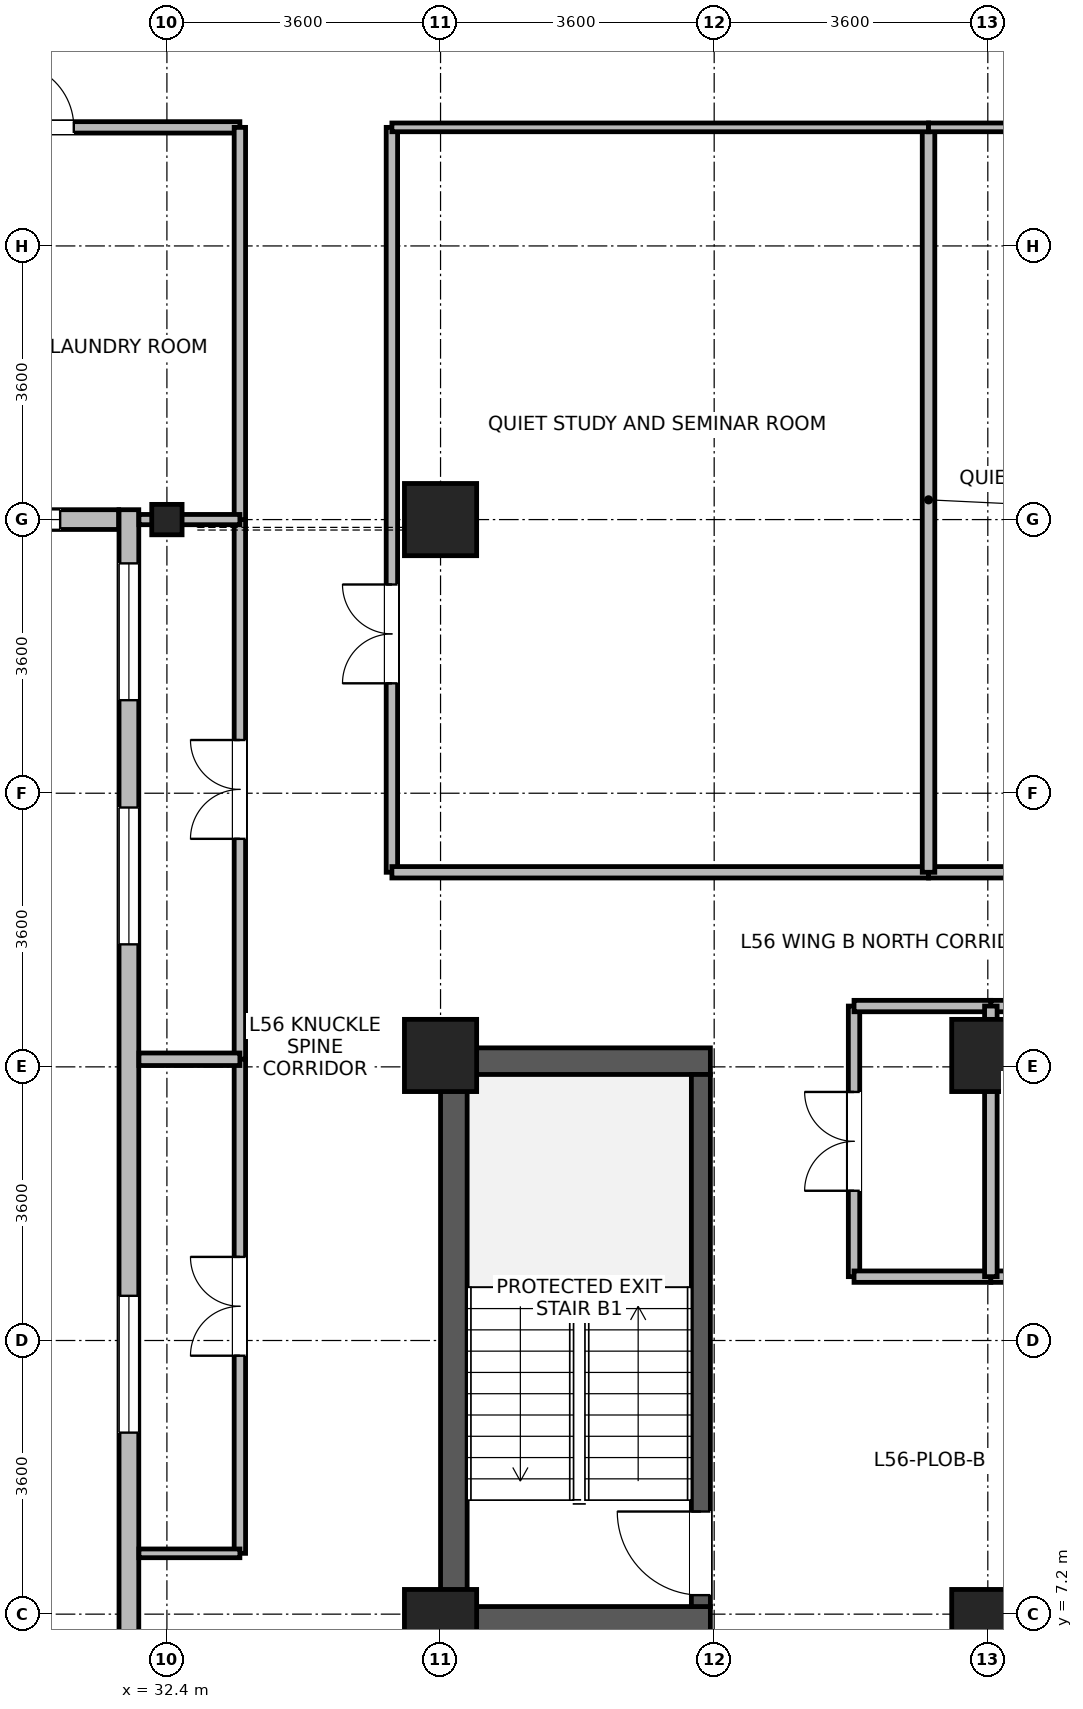
"""IFC4 building model, lengths in metres.
Left out: names, types, materials, properties, quantities, classifications, styles, units other than length and angle.
Written with IfcOpenShell. Run it as: python <this file> out.ifc"""

import sys

from ifc_helpers import new_model, si_unit, direction, frame, frame_2d, origin, origin_2d, place, context, subcontext, project, spatial, rectangle, i_section, extrude, source, transform, mapped, element, fill, save


model = new_model("IFC4")
c1 = context("Model", 3, precision=1e-05, world=origin(), true_north=direction((0.0, 1.0)))
c2 = subcontext(c1, "Body", "Model", "MODEL_VIEW")
j1 = project(units=[si_unit("LENGTHUNIT", "METRE"), si_unit("PLANEANGLEUNIT", "RADIAN")], contexts=[c1])
p1 = place(None, origin())
s1 = spatial("IfcSite", under=j1, at=p1, CompositionType="ELEMENT")
p2 = place(p1, origin())
s2 = spatial("IfcBuilding", under=s1, at=p2, CompositionType="ELEMENT")
p3 = place(p2, frame((0.0, 0.0, 220.3)))
s3 = spatial("IfcBuildingStorey", under=s2, at=p3, CompositionType="ELEMENT", Elevation=220.3)
p4 = place(p3, frame((36.175, 6.95, 0.0), z_axis=(0.0, 0.0, 1.0), x_axis=(0.0, 1.0, 0.0)))
e1 = element("IfcWall", 1, at=p4, inside=s3, PredefinedType="SHEAR", context=c2, shape_type="SweptSolid", body=[
    extrude(rectangle(XDim=7.7, YDim=0.35, at=frame_2d((3.85, 0.0))), origin(), (0.0, 0.0, 1.0), 3.47),
])
for number, where, z_axis, x_axis in (
    (2, (36.35, 7.125, 0.0), (0.0, 0.0, 1.0), (1.0, 0.0, 0.0)),
    (3, (36.35, 14.475, 0.0), (0.0, 0.0, 1.0), (1.0, 0.0, 0.0)),
):
    element("IfcWall", number, at=place(p3, frame(where, z_axis=z_axis, x_axis=x_axis)), inside=s3, PredefinedType="SHEAR", context=c2, shape_type="SweptSolid", body=[
        extrude(rectangle(XDim=3.2, YDim=0.35, at=frame_2d((1.6, 0.0))), origin(), (0.0, 0.0, 1.0), 3.47),
    ])
p5 = place(p3, frame((39.425, 7.3, 0.0), z_axis=(0.0, 0.0, 1.0), x_axis=(0.0, 1.0, 0.0)))
e4 = element("IfcWall", 4, at=p5, inside=s3, PredefinedType="SHEAR", context=c2, shape_type="SweptSolid", body=[
    extrude(rectangle(XDim=7.0, YDim=0.25, at=frame_2d((3.5, 0.0))), origin(), (0.0, 0.0, 1.0), 3.47),
])
p6 = place(p5, frame((0.15, 0.0, 0.0)))
e5 = element("IfcOpeningElement", 5, at=p6, cuts=e4, PredefinedType="OPENING", context=c2, shape_type="SweptSolid", body=[
    extrude(rectangle(XDim=1.1, YDim=2.08, at=frame_2d((0.55, 1.04))), frame((0.0, 0.135, 0.0), z_axis=(0.0, -1.0, 0.0), x_axis=(1.0, 0.0, 0.0)), (0.0, 0.0, 1.0), 0.27),
])
m1 = source(origin(), c2, "Body", "SweptSolid", [
    extrude(rectangle(XDim=0.95, YDim=0.95, at=origin_2d()), origin(), (0.0, 0.0, 1.0), 3.7),
])
for number, where, z_axis, x_axis in (
    (6, (36.0, 21.6, 0.0), (0.0, 0.0, 1.0), (1.0, 0.0, 0.0)),
    (7, (36.0, 7.05, 0.0), (0.0, 0.0, 1.0), (1.0, 0.0, 0.0)),
    (8, (36.0, 14.55, 0.0), (0.0, 0.0, 1.0), (1.0, 0.0, 0.0)),
    (9, (43.2, 7.05, 0.0), (0.0, 0.0, 1.0), (1.0, 0.0, 0.0)),
    (10, (43.2, 14.55, 0.0), (0.0, 0.0, 1.0), (1.0, 0.0, 0.0)),
):
    element("IfcColumn", number, at=place(p3, frame(where, z_axis=z_axis, x_axis=x_axis)), inside=s3, PredefinedType="COLUMN", context=c2, shape_type="MappedRepresentation", body=[
        mapped(m1, transform((0.0, 0.0, 0.0), x_axis=(1.0, 0.0, 0.0), y_axis=(0.0, 1.0, 0.0), z_axis=(0.0, 0.0, 1.0), scale=1.0)),
    ])
m2 = source(origin(), c2, "Body", "SweptSolid", [
    extrude(i_section(OverallWidth=0.399, OverallDepth=0.4, WebThickness=0.017, FlangeThickness=0.023, FilletRadius=0.015, at=origin_2d()), origin(), (0.0, 0.0, 1.0), 3.7),
])
p7 = place(p3, frame((32.4, 21.6, 0.0), z_axis=(0.0, 0.0, 1.0), x_axis=(1.0, 0.0, 0.0)))
e11 = element("IfcColumn", 11, at=p7, inside=s3, PredefinedType="COLUMN", context=c2, shape_type="MappedRepresentation", body=[
    mapped(m2, transform((0.0, 0.0, 0.0), x_axis=(1.0, 0.0, 0.0), y_axis=(0.0, 1.0, 0.0), z_axis=(0.0, 0.0, 1.0), scale=1.0)),
])
p8 = place(p3, frame((31.765, 21.6, 0.0), z_axis=(0.0, 0.0, 1.0), x_axis=(-1.0, 0.0, 0.0)))
e12 = element("IfcWall", 12, at=p8, inside=s3, PredefinedType="STANDARD", context=c2, shape_type="SweptSolid", body=[
    extrude(rectangle(XDim=2.489, YDim=0.26, at=frame_2d((1.245, 0.0))), origin(), (0.0, 0.0, 1.0), 3.05),
])
p9 = place(p8, frame((0.77, 0.0, 0.85)))
e13 = element("IfcOpeningElement", 13, at=p9, cuts=e12, PredefinedType="OPENING", context=c2, shape_type="SweptSolid", body=[
    extrude(rectangle(XDim=0.95, YDim=1.75, at=frame_2d((0.475, 0.875))), frame((0.0, 0.14, 0.0), z_axis=(0.0, -1.0, 0.0), x_axis=(1.0, 0.0, 0.0)), (0.0, 0.0, 1.0), 0.28),
])
p10 = place(p3, frame((31.9, 5.67, 0.0), z_axis=(0.0, 0.0, 1.0), x_axis=(0.0, 1.0, 0.0)))
e14 = element("IfcWall", 14, at=p10, inside=s3, PredefinedType="STANDARD", context=c2, shape_type="SweptSolid", body=[
    extrude(rectangle(XDim=16.06, YDim=0.26, at=frame_2d((8.03, 0.0))), origin(), (0.0, 0.0, 1.0), 3.45),
])
p11 = place(p10, frame((3.918, 0.0, 0.85)))
e15 = element("IfcOpeningElement", 15, at=p11, cuts=e14, PredefinedType="OPENING", context=c2, shape_type="SweptSolid", body=[
    extrude(rectangle(XDim=1.8, YDim=1.85, at=frame_2d((0.9, 0.925))), frame((0.0, 0.14, 0.0), z_axis=(0.0, -1.0, 0.0), x_axis=(1.0, 0.0, 0.0)), (0.0, 0.0, 1.0), 0.28),
])
p12 = place(p10, frame((10.342, 0.0, 0.85)))
e16 = element("IfcOpeningElement", 16, at=p12, cuts=e14, PredefinedType="OPENING", context=c2, shape_type="SweptSolid", body=[
    extrude(rectangle(XDim=1.8, YDim=1.85, at=frame_2d((0.9, 0.925))), frame((0.0, 0.14, 0.0), z_axis=(0.0, -1.0, 0.0), x_axis=(1.0, 0.0, 0.0)), (0.0, 0.0, 1.0), 0.28),
])
p13 = place(p10, frame((13.554, 0.0, 0.85)))
e17 = element("IfcOpeningElement", 17, at=p13, cuts=e14, PredefinedType="OPENING", context=c2, shape_type="SweptSolid", body=[
    extrude(rectangle(XDim=1.8, YDim=1.85, at=frame_2d((0.9, 0.925))), frame((0.0, 0.14, 0.0), z_axis=(0.0, -1.0, 0.0), x_axis=(1.0, 0.0, 0.0)), (0.0, 0.0, 1.0), 0.28),
])
p14 = place(p3, frame((35.36, 16.96, 0.0), z_axis=(0.0, 0.0, 1.0), x_axis=(0.0, 1.0, 0.0)))
e18 = element("IfcWall", 18, at=p14, inside=s3, PredefinedType="PARTITIONING", context=c2, shape_type="SweptSolid", body=[
    extrude(rectangle(XDim=9.8, YDim=0.15, at=frame_2d((4.9, 0.0))), origin(), (0.0, 0.0, 1.0), 3.45),
])
p15 = place(p14, frame((2.486, 0.0, 0.0)))
e19 = element("IfcOpeningElement", 19, at=p15, cuts=e18, PredefinedType="OPENING", context=c2, shape_type="SweptSolid", body=[
    extrude(rectangle(XDim=1.3, YDim=2.12, at=frame_2d((0.65, 1.06))), frame((0.0, 0.085, 0.0), z_axis=(0.0, -1.0, 0.0), x_axis=(1.0, 0.0, 0.0)), (0.0, 0.0, 1.0), 0.17),
])
p16 = place(p3, frame((33.36, 14.5, 0.0), z_axis=(0.0, 0.0, 1.0), x_axis=(0.0, 1.0, 0.0)))
e20 = element("IfcWall", 20, at=p16, inside=s3, PredefinedType="PARTITIONING", context=c2, shape_type="SweptSolid", body=[
    extrude(rectangle(XDim=7.1, YDim=0.15, at=frame_2d((3.55, 0.0))), origin(), (0.0, 0.0, 1.0), 3.45),
])
p17 = place(p16, frame((2.9, 0.0, 0.0)))
e21 = element("IfcOpeningElement", 21, at=p17, cuts=e20, PredefinedType="OPENING", context=c2, shape_type="SweptSolid", body=[
    extrude(rectangle(XDim=1.3, YDim=2.12, at=frame_2d((0.65, 1.06))), frame((0.0, 0.085, 0.0), z_axis=(0.0, -1.0, 0.0), x_axis=(1.0, 0.0, 0.0)), (0.0, 0.0, 1.0), 0.17),
])
p18 = place(p3, frame((35.36, 16.96, 0.0), z_axis=(0.0, 0.0, 1.0), x_axis=(1.0, 0.0, 0.0)))
e22 = element("IfcWall", 22, at=p18, inside=s3, PredefinedType="PARTITIONING", context=c2, shape_type="SweptSolid", body=[
    extrude(rectangle(XDim=7.06, YDim=0.15, at=frame_2d((3.53, 0.0))), origin(), (0.0, 0.0, 1.0), 3.45),
])
p19 = place(p3, frame((33.36, 8.0, 0.0), z_axis=(0.0, 0.0, 1.0), x_axis=(0.0, 1.0, 0.0)))
e23 = element("IfcWall", 23, at=p19, inside=s3, PredefinedType="PARTITIONING", context=c2, shape_type="SweptSolid", body=[
    extrude(rectangle(XDim=6.5, YDim=0.15, at=frame_2d((3.25, 0.0))), origin(), (0.0, 0.0, 1.0), 3.45),
])
p20 = place(p19, frame((2.6, 0.0, 0.0)))
e24 = element("IfcOpeningElement", 24, at=p20, cuts=e23, PredefinedType="OPENING", context=c2, shape_type="SweptSolid", body=[
    extrude(rectangle(XDim=1.3, YDim=2.12, at=frame_2d((0.65, 1.06))), frame((0.0, 0.085, 0.0), z_axis=(0.0, -1.0, 0.0), x_axis=(1.0, 0.0, 0.0)), (0.0, 0.0, 1.0), 0.17),
])
p21 = place(p3, frame((42.42, 16.96, 0.0), z_axis=(0.0, 0.0, 1.0), x_axis=(1.0, 0.0, 0.0)))
e25 = element("IfcWall", 25, at=p21, inside=s3, PredefinedType="PARTITIONING", context=c2, shape_type="SweptSolid", body=[
    extrude(rectangle(XDim=5.26, YDim=0.15, at=frame_2d((2.63, 0.0))), origin(), (0.0, 0.0, 1.0), 3.45),
])
p22 = place(p21, frame((1.98, 0.0, 0.0)))
e26 = element("IfcOpeningElement", 26, at=p22, cuts=e25, PredefinedType="OPENING", context=c2, shape_type="SweptSolid", body=[
    extrude(rectangle(XDim=1.3, YDim=2.12, at=frame_2d((0.65, 1.06))), frame((0.0, 0.085, 0.0), z_axis=(0.0, -1.0, 0.0), x_axis=(1.0, 0.0, 0.0)), (0.0, 0.0, 1.0), 0.17),
])
p23 = place(p3, frame((28.14, 26.76, 0.0), z_axis=(0.0, 0.0, 1.0), x_axis=(1.0, 0.0, 0.0)))
e27 = element("IfcWall", 27, at=p23, inside=s3, PredefinedType="PARTITIONING", context=c2, shape_type="SweptSolid", body=[
    extrude(rectangle(XDim=5.22, YDim=0.15, at=frame_2d((2.61, 0.0))), origin(), (0.0, 0.0, 1.0), 3.45),
])
p24 = place(p23, frame((2.185, 0.0, 0.0)))
e28 = element("IfcOpeningElement", 28, at=p24, cuts=e27, PredefinedType="OPENING", context=c2, shape_type="SweptSolid", body=[
    extrude(rectangle(XDim=0.85, YDim=2.04, at=frame_2d((0.425, 1.02))), frame((0.0, 0.085, 0.0), z_axis=(0.0, -1.0, 0.0), x_axis=(1.0, 0.0, 0.0)), (0.0, 0.0, 1.0), 0.17),
])
p25 = place(p3, frame((33.36, 21.6, 0.0), z_axis=(0.0, 0.0, 1.0), x_axis=(0.0, 1.0, 0.0)))
e29 = element("IfcWall", 29, at=p25, inside=s3, PredefinedType="PARTITIONING", context=c2, shape_type="SweptSolid", body=[
    extrude(rectangle(XDim=5.16, YDim=0.15, at=frame_2d((2.58, 0.0))), origin(), (0.0, 0.0, 1.0), 3.45),
])
p26 = place(p3, frame((41.44, 11.64, 0.0), z_axis=(0.0, 0.0, 1.0), x_axis=(0.0, 1.0, 0.0)))
e30 = element("IfcWall", 30, at=p26, inside=s3, PredefinedType="PARTITIONING", context=c2, shape_type="SweptSolid", body=[
    extrude(rectangle(XDim=3.56, YDim=0.15, at=frame_2d((1.78, 0.0))), origin(), (0.0, 0.0, 1.0), 3.45),
])
p27 = place(p26, frame((1.13, 0.0, 0.0)))
e31 = element("IfcOpeningElement", 31, at=p27, cuts=e30, PredefinedType="OPENING", context=c2, shape_type="SweptSolid", body=[
    extrude(rectangle(XDim=1.3, YDim=2.12, at=frame_2d((0.65, 1.06))), frame((0.0, 0.085, 0.0), z_axis=(0.0, -1.0, 0.0), x_axis=(1.0, 0.0, 0.0)), (0.0, 0.0, 1.0), 0.17),
])
for number, where, z_axis, x_axis in (
    (32, (41.44, 11.64, 0.0), (0.0, 0.0, 1.0), (1.0, 0.0, 0.0)),
    (33, (41.44, 15.2, 0.0), (0.0, 0.0, 1.0), (1.0, 0.0, 0.0)),
):
    element("IfcWall", number, at=place(p3, frame(where, z_axis=z_axis, x_axis=x_axis)), inside=s3, PredefinedType="PARTITIONING", context=c2, shape_type="SweptSolid", body=[
        extrude(rectangle(XDim=1.8, YDim=0.15, at=frame_2d((0.9, 0.0))), origin(), (0.0, 0.0, 1.0), 3.45),
    ])
p28 = place(p3, frame((43.24, 11.64, 0.0), z_axis=(0.0, 0.0, 1.0), x_axis=(1.0, 0.0, 0.0)))
e34 = element("IfcWall", 34, at=p28, inside=s3, PredefinedType="PARTITIONING", context=c2, shape_type="SweptSolid", body=[
    extrude(rectangle(XDim=1.77, YDim=0.15, at=frame_2d((0.885, 0.0))), origin(), (0.0, 0.0, 1.0), 3.45),
])
p29 = place(p28, frame((0.455, 0.0, 0.0)))
e35 = element("IfcOpeningElement", 35, at=p29, cuts=e34, PredefinedType="OPENING", context=c2, shape_type="SweptSolid", body=[
    extrude(rectangle(XDim=0.86, YDim=2.02, at=frame_2d((0.43, 1.01))), frame((0.0, 0.085, 0.0), z_axis=(0.0, -1.0, 0.0), x_axis=(1.0, 0.0, 0.0)), (0.0, 0.0, 1.0), 0.17),
])
p30 = place(p3, frame((43.24, 15.2, 0.0), z_axis=(0.0, 0.0, 1.0), x_axis=(1.0, 0.0, 0.0)))
e36 = element("IfcWall", 36, at=p30, inside=s3, PredefinedType="PARTITIONING", context=c2, shape_type="SweptSolid", body=[
    extrude(rectangle(XDim=1.8, YDim=0.15, at=frame_2d((0.9, 0.0))), origin(), (0.0, 0.0, 1.0), 3.45),
])
p31 = place(p3, frame((42.42, 16.96, 0.0), z_axis=(0.0, 0.0, 1.0), x_axis=(0.0, 1.0, 0.0)))
e37 = element("IfcWall", 37, at=p31, inside=s3, PredefinedType="PARTITIONING", context=c2, shape_type="SweptSolid", body=[
    extrude(rectangle(XDim=9.8, YDim=0.165, at=frame_2d((4.9, 0.0))), origin(), (0.0, 0.0, 1.0), 3.45),
])
p32 = place(p3, frame((35.36, 26.76, 0.0), z_axis=(0.0, 0.0, 1.0), x_axis=(1.0, 0.0, 0.0)))
e38 = element("IfcWall", 38, at=p32, inside=s3, PredefinedType="PARTITIONING", context=c2, shape_type="SweptSolid", body=[
    extrude(rectangle(XDim=7.06, YDim=0.115, at=frame_2d((3.53, 0.0))), origin(), (0.0, 0.0, 1.0), 3.45),
])
p33 = place(p3, frame((42.42, 26.76, 0.0), z_axis=(0.0, 0.0, 1.0), x_axis=(1.0, 0.0, 0.0)))
e39 = element("IfcWall", 39, at=p33, inside=s3, PredefinedType="PARTITIONING", context=c2, shape_type="SweptSolid", body=[
    extrude(rectangle(XDim=5.26, YDim=0.115, at=frame_2d((2.63, 0.0))), origin(), (0.0, 0.0, 1.0), 3.45),
])
p34 = place(p3, frame((43.24, 11.64, 0.0), z_axis=(0.0, 0.0, 1.0), x_axis=(0.0, 1.0, 0.0)))
e40 = element("IfcWall", 40, at=p34, inside=s3, PredefinedType="PARTITIONING", context=c2, shape_type="SweptSolid", body=[
    extrude(rectangle(XDim=3.56, YDim=0.165, at=frame_2d((1.78, 0.0))), origin(), (0.0, 0.0, 1.0), 3.45),
])
p35 = place(p3, frame((32.032, 8.0, 0.0), z_axis=(0.0, 0.0, 1.0), x_axis=(1.0, 0.0, 0.0)))
e41 = element("IfcWall", 41, at=p35, inside=s3, PredefinedType="PARTITIONING", context=c2, shape_type="SweptSolid", body=[
    extrude(rectangle(XDim=1.328, YDim=0.115, at=frame_2d((0.664, 0.0))), origin(), (0.0, 0.0, 1.0), 3.45),
])
p36 = place(p3, frame((32.032, 14.5, 0.0), z_axis=(0.0, 0.0, 1.0), x_axis=(1.0, 0.0, 0.0)))
e42 = element("IfcWall", 42, at=p36, inside=s3, PredefinedType="PARTITIONING", context=c2, shape_type="SweptSolid", body=[
    extrude(rectangle(XDim=1.328, YDim=0.165, at=frame_2d((0.664, 0.0))), origin(), (0.0, 0.0, 1.0), 3.45),
])
p37 = place(p3, frame((32.032, 21.6, 0.0), z_axis=(0.0, 0.0, 1.0), x_axis=(1.0, 0.0, 0.0)))
e43 = element("IfcWall", 43, at=p37, inside=s3, PredefinedType="PARTITIONING", context=c2, shape_type="SweptSolid", body=[
    extrude(rectangle(XDim=1.328, YDim=0.135, at=frame_2d((0.664, 0.0))), origin(), (0.0, 0.0, 1.0), 3.05),
])
p38 = place(p9, origin())
e44 = element("IfcWindow", 44, at=p38, inside=s3, PartitioningType="SINGLE_PANEL", PredefinedType="WINDOW", context=c2, shape_type="SweptSolid", body=[
    extrude(rectangle(XDim=0.95, YDim=1.75, at=frame_2d((0.475, 0.875))), frame((0.0, 0.03, 0.0), z_axis=(0.0, -1.0, 0.0), x_axis=(1.0, 0.0, 0.0)), (0.0, 0.0, 1.0), 0.06),
])
fill(e13, e44)
p39 = place(p11, origin())
e45 = element("IfcWindow", 45, at=p39, inside=s3, PartitioningType="SINGLE_PANEL", PredefinedType="WINDOW", context=c2, shape_type="SweptSolid", body=[
    extrude(rectangle(XDim=1.8, YDim=1.85, at=frame_2d((0.9, 0.925))), frame((0.0, 0.03, 0.0), z_axis=(0.0, -1.0, 0.0), x_axis=(1.0, 0.0, 0.0)), (0.0, 0.0, 1.0), 0.06),
])
fill(e15, e45)
p40 = place(p12, origin())
e46 = element("IfcWindow", 46, at=p40, inside=s3, PartitioningType="SINGLE_PANEL", PredefinedType="WINDOW", context=c2, shape_type="SweptSolid", body=[
    extrude(rectangle(XDim=1.8, YDim=1.85, at=frame_2d((0.9, 0.925))), frame((0.0, 0.03, 0.0), z_axis=(0.0, -1.0, 0.0), x_axis=(1.0, 0.0, 0.0)), (0.0, 0.0, 1.0), 0.06),
])
fill(e16, e46)
p41 = place(p13, origin())
e47 = element("IfcWindow", 47, at=p41, inside=s3, PartitioningType="SINGLE_PANEL", PredefinedType="WINDOW", context=c2, shape_type="SweptSolid", body=[
    extrude(rectangle(XDim=1.8, YDim=1.85, at=frame_2d((0.9, 0.925))), frame((0.0, 0.03, 0.0), z_axis=(0.0, -1.0, 0.0), x_axis=(1.0, 0.0, 0.0)), (0.0, 0.0, 1.0), 0.06),
])
fill(e17, e47)
p42 = place(p6, origin())
e48 = element("IfcDoor", 48, at=p42, inside=s3, OperationType="SINGLE_SWING_RIGHT", PredefinedType="DOOR", context=c2, shape_type="SweptSolid", body=[
    extrude(rectangle(XDim=1.1, YDim=2.08, at=frame_2d((0.55, 1.04))), frame((0.0, 0.025, 0.0), z_axis=(0.0, -1.0, 0.0), x_axis=(1.0, 0.0, 0.0)), (0.0, 0.0, 1.0), 0.05),
])
fill(e5, e48)
p43 = place(p15, origin())
e49 = element("IfcDoor", 49, at=p43, inside=s3, OperationType="DOUBLE_DOOR_SINGLE_SWING", PredefinedType="DOOR", context=c2, shape_type="SweptSolid", body=[
    extrude(rectangle(XDim=1.3, YDim=2.12, at=frame_2d((0.65, 1.06))), frame((0.0, 0.025, 0.0), z_axis=(0.0, -1.0, 0.0), x_axis=(1.0, 0.0, 0.0)), (0.0, 0.0, 1.0), 0.05),
])
fill(e19, e49)
p44 = place(p17, origin())
e50 = element("IfcDoor", 50, at=p44, inside=s3, OperationType="DOUBLE_DOOR_SINGLE_SWING", PredefinedType="DOOR", context=c2, shape_type="SweptSolid", body=[
    extrude(rectangle(XDim=1.3, YDim=2.12, at=frame_2d((0.65, 1.06))), frame((0.0, 0.025, 0.0), z_axis=(0.0, -1.0, 0.0), x_axis=(1.0, 0.0, 0.0)), (0.0, 0.0, 1.0), 0.05),
])
fill(e21, e50)
p45 = place(p20, origin())
e51 = element("IfcDoor", 51, at=p45, inside=s3, OperationType="DOUBLE_DOOR_SINGLE_SWING", PredefinedType="DOOR", context=c2, shape_type="SweptSolid", body=[
    extrude(rectangle(XDim=1.3, YDim=2.12, at=frame_2d((0.65, 1.06))), frame((0.0, 0.025, 0.0), z_axis=(0.0, -1.0, 0.0), x_axis=(1.0, 0.0, 0.0)), (0.0, 0.0, 1.0), 0.05),
])
fill(e24, e51)
p46 = place(p24, origin())
e52 = element("IfcDoor", 52, at=p46, inside=s3, OperationType="SINGLE_SWING_LEFT", PredefinedType="DOOR", context=c2, shape_type="SweptSolid", body=[
    extrude(rectangle(XDim=0.85, YDim=2.04, at=frame_2d((0.425, 1.02))), frame((0.0, 0.025, 0.0), z_axis=(0.0, -1.0, 0.0), x_axis=(1.0, 0.0, 0.0)), (0.0, 0.0, 1.0), 0.05),
])
fill(e28, e52)
p47 = place(p27, origin())
e53 = element("IfcDoor", 53, at=p47, inside=s3, OperationType="DOUBLE_DOOR_SINGLE_SWING", PredefinedType="DOOR", context=c2, shape_type="SweptSolid", body=[
    extrude(rectangle(XDim=1.3, YDim=2.12, at=frame_2d((0.65, 1.06))), frame((0.0, 0.025, 0.0), z_axis=(0.0, -1.0, 0.0), x_axis=(1.0, 0.0, 0.0)), (0.0, 0.0, 1.0), 0.05),
])
fill(e31, e53)
save(model, sys.argv[1])
